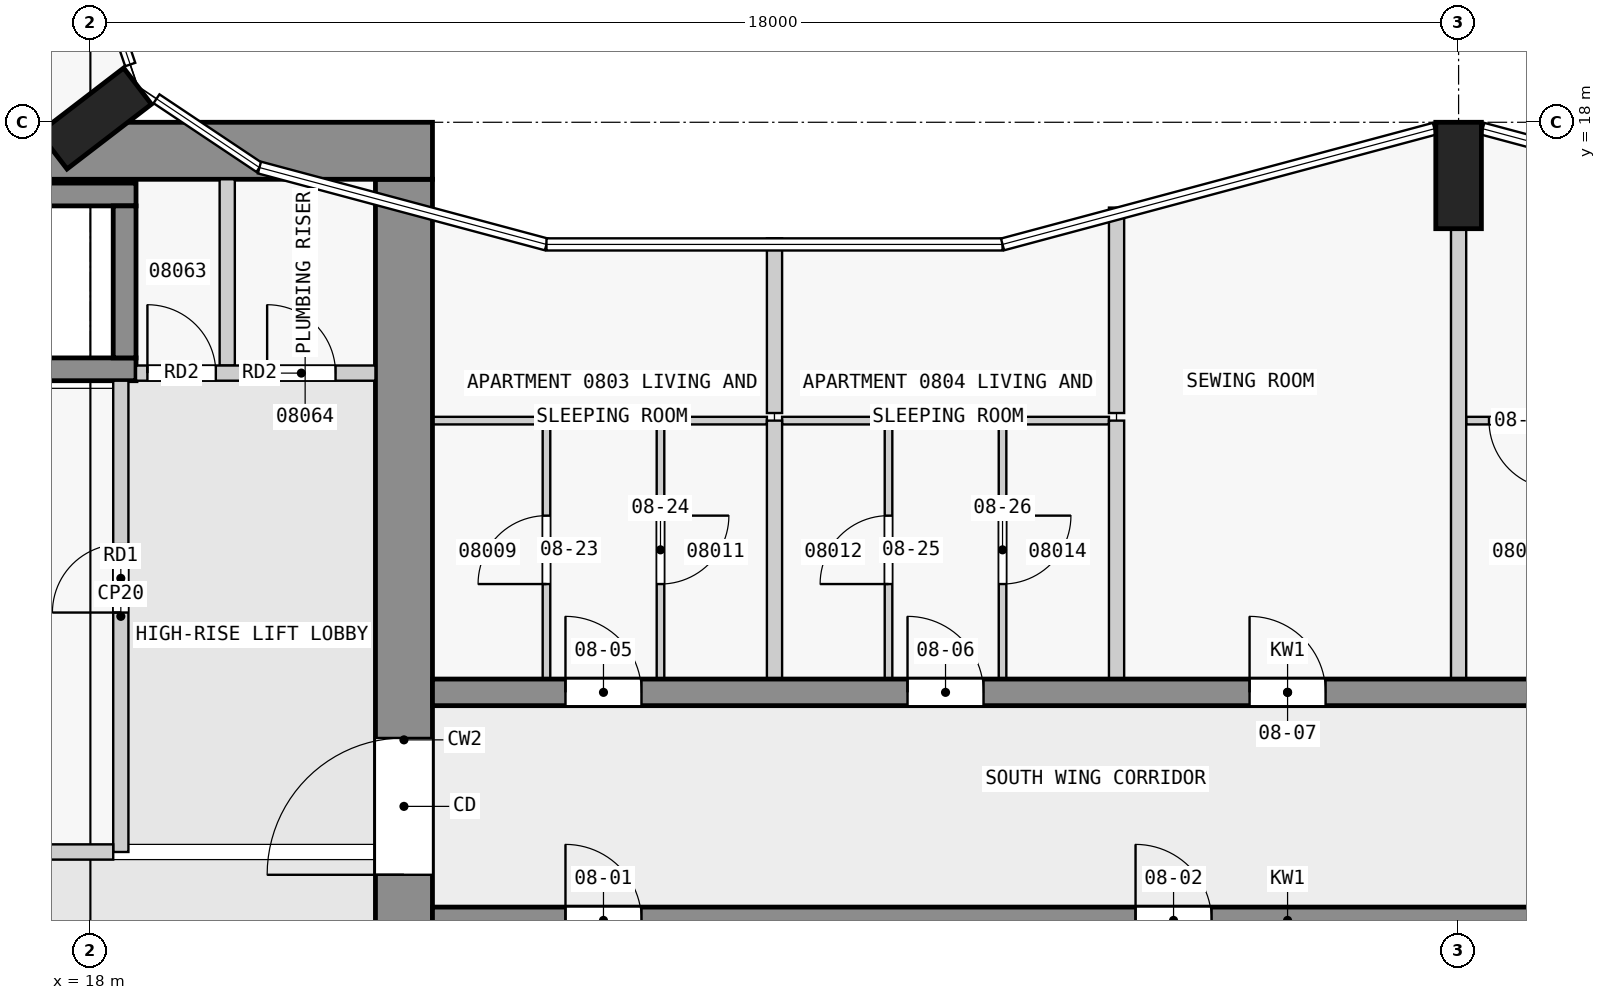
"""IFC4 building model, lengths in metres.
Left out: names, types, materials, properties, quantities, classifications, styles, units other than length and angle.
Written with IfcOpenShell. Run it as: python <this file> out.ifc"""

import sys

from ifc_helpers import new_model, si_unit, direction, frame, frame_2d, origin, origin_2d, place, context, subcontext, project, spatial, rectangle, extrude, element, fill, save


model = new_model("IFC4")
c1 = context("Model", 3, precision=1e-05, world=origin(), true_north=direction((0.0, 1.0)))
c2 = subcontext(c1, "Body", "Model", "MODEL_VIEW")
j1 = project(units=[si_unit("LENGTHUNIT", "METRE"), si_unit("PLANEANGLEUNIT", "RADIAN")], contexts=[c1])
p1 = place(None, origin())
s1 = spatial("IfcSite", under=j1, at=p1, CompositionType="ELEMENT")
p2 = place(p1, origin())
s2 = spatial("IfcBuilding", under=s1, at=p2, CompositionType="ELEMENT")
p3 = place(p2, frame((0.0, 0.0, 37.3)))
s3 = spatial("IfcBuildingStorey", under=s2, at=p3, CompositionType="ELEMENT", Elevation=37.3)
for number, where, z_axis, x_axis in (
    (1, (36.0, 17.3, 0.0), (0.0, 0.0, 1.0), (1.0, 0.0, 0.0)),
    (2, (18.065, 18.05, 0.0), (0.0, 0.0, 1.0), (-0.609, 0.793, 0.0)),
):
    element("IfcColumn", number, at=place(p3, frame(where, z_axis=z_axis, x_axis=x_axis)), inside=s3, PredefinedType="COLUMN", context=c2, shape_type="SweptSolid", body=[
        extrude(rectangle(XDim=0.6, YDim=1.4, at=origin_2d()), origin(), (0.0, 0.0, 1.0), 3.5),
    ])
p4 = place(p3, frame((1.55, 17.625, 0.0), z_axis=(0.0, 0.0, 1.0), x_axis=(1.0, 0.0, 0.0)))
e3 = element("IfcWall", 3, at=p4, inside=s3, PredefinedType="SHEAR", context=c2, shape_type="SweptSolid", body=[
    extrude(rectangle(XDim=20.95, YDim=0.75, at=frame_2d((10.475, 0.0))), origin(), (0.0, 0.0, 1.0), 3.25),
])
p5 = place(p4, frame((6.55, 0.0, 0.0)))
e4 = element("IfcOpeningElement", 4, at=p5, cuts=e3, PredefinedType="OPENING", context=c2, shape_type="SweptSolid", body=[
    extrude(rectangle(XDim=1.8, YDim=2.1, at=frame_2d((0.9, 1.05))), frame((0.0, 0.385, 0.0), z_axis=(0.0, -1.0, 0.0), x_axis=(1.0, 0.0, 0.0)), (0.0, 0.0, 1.0), 0.77),
])
p6 = place(p3, frame((22.125, 2.5, 0.0), z_axis=(0.0, 0.0, 1.0), x_axis=(0.0, 1.0, 0.0)))
e5 = element("IfcWall", 5, at=p6, inside=s3, PredefinedType="SHEAR", context=c2, shape_type="SweptSolid", body=[
    extrude(rectangle(XDim=14.75, YDim=0.75, at=frame_2d((7.375, 0.0))), origin(), (0.0, 0.0, 1.0), 3.25),
])
p7 = place(p6, frame((5.6, 0.0, 0.0)))
e6 = element("IfcOpeningElement", 6, at=p7, cuts=e5, PredefinedType="OPENING", context=c2, shape_type="SweptSolid", body=[
    extrude(rectangle(XDim=1.8, YDim=2.1, at=frame_2d((0.9, 1.05))), frame((0.0, 0.385, 0.0), z_axis=(0.0, -1.0, 0.0), x_axis=(1.0, 0.0, 0.0)), (0.0, 0.0, 1.0), 0.77),
])
for number, where, z_axis, x_axis in (
    (7, (10.8, 17.05, 0.0), (0.0, 0.0, 1.0), (1.0, 0.0, 0.0)),
    (8, (10.8, 14.75, 0.0), (0.0, 0.0, 1.0), (1.0, 0.0, 0.0)),
):
    element("IfcWall", number, at=place(p3, frame(where, z_axis=z_axis, x_axis=x_axis)), inside=s3, PredefinedType="SHEAR", context=c2, shape_type="SweptSolid", body=[
        extrude(rectangle(XDim=7.8, YDim=0.3, at=frame_2d((3.9, 0.0))), origin(), (0.0, 0.0, 1.0), 3.25),
    ])
p8 = place(p3, frame((18.45, 14.9, 0.0), z_axis=(0.0, 0.0, 1.0), x_axis=(0.0, 1.0, 0.0)))
e9 = element("IfcWall", 9, at=p8, inside=s3, PredefinedType="SHEAR", context=c2, shape_type="SweptSolid", body=[
    extrude(rectangle(XDim=2.0, YDim=0.3, at=frame_2d((1.0, 0.0))), origin(), (0.0, 0.0, 1.0), 3.25),
])
p9 = place(p3, frame((22.5, 7.5, 0.0), z_axis=(0.0, 0.0, 1.0), x_axis=(1.0, 0.0, 0.0)))
e10 = element("IfcWall", 10, at=p9, inside=s3, PredefinedType="SHEAR", context=c2, shape_type="SweptSolid", body=[
    extrude(rectangle(XDim=22.5, YDim=0.35, at=frame_2d((11.25, 0.0))), origin(), (0.0, 0.0, 1.0), 3.25),
])
p10 = place(p9, frame((1.75, 0.0, 0.0)))
e11 = element("IfcOpeningElement", 11, at=p10, cuts=e10, PredefinedType="OPENING", context=c2, shape_type="SweptSolid", body=[
    extrude(rectangle(XDim=1.0, YDim=2.1, at=frame_2d((0.5, 1.05))), frame((0.0, 0.185, 0.0), z_axis=(0.0, -1.0, 0.0), x_axis=(1.0, 0.0, 0.0)), (0.0, 0.0, 1.0), 0.37),
])
p11 = place(p9, frame((9.25, 0.0, 0.0)))
e12 = element("IfcOpeningElement", 12, at=p11, cuts=e10, PredefinedType="OPENING", context=c2, shape_type="SweptSolid", body=[
    extrude(rectangle(XDim=1.0, YDim=2.1, at=frame_2d((0.5, 1.05))), frame((0.0, 0.185, 0.0), z_axis=(0.0, -1.0, 0.0), x_axis=(1.0, 0.0, 0.0)), (0.0, 0.0, 1.0), 0.37),
])
p12 = place(p9, frame((18.75, 0.0, 0.0)))
e13 = element("IfcOpeningElement", 13, at=p12, cuts=e10, PredefinedType="OPENING", context=c2, shape_type="SweptSolid", body=[
    extrude(rectangle(XDim=0.9, YDim=2.1, at=frame_2d((0.45, 1.05))), frame((0.0, 0.185, 0.0), z_axis=(0.0, -1.0, 0.0), x_axis=(1.0, 0.0, 0.0)), (0.0, 0.0, 1.0), 0.37),
])
p13 = place(p9, frame((20.95, 0.0, 0.0)))
e14 = element("IfcOpeningElement", 14, at=p13, cuts=e10, PredefinedType="OPENING", context=c2, shape_type="SweptSolid", body=[
    extrude(rectangle(XDim=1.0, YDim=2.1, at=frame_2d((0.5, 1.05))), frame((0.0, 0.185, 0.0), z_axis=(0.0, -1.0, 0.0), x_axis=(1.0, 0.0, 0.0)), (0.0, 0.0, 1.0), 0.37),
])
p14 = place(p3, frame((22.5, 10.5, 0.0), z_axis=(0.0, 0.0, 1.0), x_axis=(1.0, 0.0, 0.0)))
e15 = element("IfcWall", 15, at=p14, inside=s3, PredefinedType="SHEAR", context=c2, shape_type="SweptSolid", body=[
    extrude(rectangle(XDim=22.5, YDim=0.35, at=frame_2d((11.25, 0.0))), origin(), (0.0, 0.0, 1.0), 3.25),
])
p15 = place(p14, frame((1.75, 0.0, 0.0)))
e16 = element("IfcOpeningElement", 16, at=p15, cuts=e15, PredefinedType="OPENING", context=c2, shape_type="SweptSolid", body=[
    extrude(rectangle(XDim=1.0, YDim=2.1, at=frame_2d((0.5, 1.05))), frame((0.0, 0.185, 0.0), z_axis=(0.0, -1.0, 0.0), x_axis=(1.0, 0.0, 0.0)), (0.0, 0.0, 1.0), 0.37),
])
p16 = place(p14, frame((6.25, 0.0, 0.0)))
e17 = element("IfcOpeningElement", 17, at=p16, cuts=e15, PredefinedType="OPENING", context=c2, shape_type="SweptSolid", body=[
    extrude(rectangle(XDim=1.0, YDim=2.1, at=frame_2d((0.5, 1.05))), frame((0.0, 0.185, 0.0), z_axis=(0.0, -1.0, 0.0), x_axis=(1.0, 0.0, 0.0)), (0.0, 0.0, 1.0), 0.37),
])
p17 = place(p14, frame((10.75, 0.0, 0.0)))
e18 = element("IfcOpeningElement", 18, at=p17, cuts=e15, PredefinedType="OPENING", context=c2, shape_type="SweptSolid", body=[
    extrude(rectangle(XDim=1.0, YDim=2.1, at=frame_2d((0.5, 1.05))), frame((0.0, 0.185, 0.0), z_axis=(0.0, -1.0, 0.0), x_axis=(1.0, 0.0, 0.0)), (0.0, 0.0, 1.0), 0.37),
])
p18 = place(p14, frame((16.85, 0.0, 0.0)))
e19 = element("IfcOpeningElement", 19, at=p18, cuts=e15, PredefinedType="OPENING", context=c2, shape_type="SweptSolid", body=[
    extrude(rectangle(XDim=1.0, YDim=2.1, at=frame_2d((0.5, 1.05))), frame((0.0, 0.185, 0.0), z_axis=(0.0, -1.0, 0.0), x_axis=(1.0, 0.0, 0.0)), (0.0, 0.0, 1.0), 0.37),
])
p19 = place(p3, frame((10.9, 8.4, 0.0), z_axis=(0.0, 0.0, 1.0), x_axis=(1.0, 0.0, 0.0)))
e20 = element("IfcWall", 20, at=p19, inside=s3, PredefinedType="PARTITIONING", context=c2, shape_type="SweptSolid", body=[
    extrude(rectangle(XDim=7.4, YDim=0.2, at=frame_2d((3.7, 0.0))), origin(), (0.0, 0.0, 1.0), 3.25),
])
p20 = place(p3, frame((18.4, 8.4, 0.0), z_axis=(0.0, 0.0, 1.0), x_axis=(0.0, 1.0, 0.0)))
e21 = element("IfcWall", 21, at=p20, inside=s3, PredefinedType="PARTITIONING", context=c2, shape_type="SweptSolid", body=[
    extrude(rectangle(XDim=6.2, YDim=0.2, at=frame_2d((3.1, 0.0))), origin(), (0.0, 0.0, 1.0), 3.25),
])
p21 = place(p20, frame((3.15, 0.0, 0.0)))
e22 = element("IfcOpeningElement", 22, at=p21, cuts=e21, PredefinedType="OPENING", context=c2, shape_type="SweptSolid", body=[
    extrude(rectangle(XDim=0.9, YDim=2.1, at=frame_2d((0.45, 1.05))), frame((0.0, 0.11, 0.0), z_axis=(0.0, -1.0, 0.0), x_axis=(1.0, 0.0, 0.0)), (0.0, 0.0, 1.0), 0.22),
])
p22 = place(p3, frame((18.6, 14.7, 0.0), z_axis=(0.0, 0.0, 1.0), x_axis=(1.0, 0.0, 0.0)))
e23 = element("IfcWall", 23, at=p22, inside=s3, PredefinedType="PARTITIONING", context=c2, shape_type="SweptSolid", body=[
    extrude(rectangle(XDim=3.15, YDim=0.2, at=frame_2d((1.575, 0.0))), origin(), (0.0, 0.0, 1.0), 3.25),
])
p23 = place(p22, frame((0.15, 0.0, 0.0)))
e24 = element("IfcOpeningElement", 24, at=p23, cuts=e23, PredefinedType="OPENING", context=c2, shape_type="SweptSolid", body=[
    extrude(rectangle(XDim=0.9, YDim=2.1, at=frame_2d((0.45, 1.05))), frame((0.0, 0.11, 0.0), z_axis=(0.0, -1.0, 0.0), x_axis=(1.0, 0.0, 0.0)), (0.0, 0.0, 1.0), 0.22),
])
p24 = place(p22, frame((1.725, 0.0, 0.0)))
e25 = element("IfcOpeningElement", 25, at=p24, cuts=e23, PredefinedType="OPENING", context=c2, shape_type="SweptSolid", body=[
    extrude(rectangle(XDim=0.9, YDim=2.1, at=frame_2d((0.45, 1.05))), frame((0.0, 0.11, 0.0), z_axis=(0.0, -1.0, 0.0), x_axis=(1.0, 0.0, 0.0)), (0.0, 0.0, 1.0), 0.22),
])
p25 = place(p3, frame((19.8, 14.8, 0.0), z_axis=(0.0, 0.0, 1.0), x_axis=(0.0, 1.0, 0.0)))
e26 = element("IfcWall", 26, at=p25, inside=s3, PredefinedType="PARTITIONING", context=c2, shape_type="SweptSolid", body=[
    extrude(rectangle(XDim=2.45, YDim=0.2, at=frame_2d((1.225, 0.0))), origin(), (0.0, 0.0, 1.0), 3.25),
])
p26 = place(p3, frame((23.95, 14.075, 0.0), z_axis=(0.0, 0.0, 1.0), x_axis=(-1.0, 0.0, 0.0)))
e27 = element("IfcWall", 27, at=p26, inside=s3, PredefinedType="PARTITIONING", context=c2, shape_type="SweptSolid", body=[
    extrude(rectangle(XDim=1.45, YDim=0.1, at=frame_2d((0.725, 0.0))), origin(), (0.0, 0.0, 1.0), 3.25),
])
for number, where, z_axis, x_axis in (
    (28, (26.9, 14.075, 0.0), (0.0, 0.0, 1.0), (-1.0, 0.0, 0.0)),
    (29, (28.45, 14.075, 0.0), (0.0, 0.0, 1.0), (-1.0, 0.0, 0.0)),
    (30, (31.4, 14.075, 0.0), (0.0, 0.0, 1.0), (-1.0, 0.0, 0.0)),
):
    element("IfcWall", number, at=place(p3, frame(where, z_axis=z_axis, x_axis=x_axis)), inside=s3, PredefinedType="PARTITIONING", context=c2, shape_type="SweptSolid", body=[
        extrude(rectangle(XDim=1.35, YDim=0.1, at=frame_2d((0.675, 0.0))), origin(), (0.0, 0.0, 1.0), 3.25),
    ])
p27 = place(p3, frame((37.55, 14.075, 0.0), z_axis=(0.0, 0.0, 1.0), x_axis=(-1.0, 0.0, 0.0)))
e31 = element("IfcWall", 31, at=p27, inside=s3, PredefinedType="PARTITIONING", context=c2, shape_type="SweptSolid", body=[
    extrude(rectangle(XDim=1.45, YDim=0.1, at=frame_2d((0.725, 0.0))), origin(), (0.0, 0.0, 1.0), 3.25),
])
p28 = place(p27, frame((0.25, 0.0, 0.0)))
e32 = element("IfcOpeningElement", 32, at=p28, cuts=e31, PredefinedType="OPENING", context=c2, shape_type="SweptSolid", body=[
    extrude(rectangle(XDim=0.9, YDim=2.1, at=frame_2d((0.45, 1.05))), frame((0.0, 0.06, 0.0), z_axis=(0.0, -1.0, 0.0), x_axis=(1.0, 0.0, 0.0)), (0.0, 0.0, 1.0), 0.12),
])
p29 = place(p3, frame((24.0, 10.675, 0.0), z_axis=(0.0, 0.0, 1.0), x_axis=(0.0, 1.0, 0.0)))
e33 = element("IfcWall", 33, at=p29, inside=s3, PredefinedType="PARTITIONING", context=c2, shape_type="SweptSolid", body=[
    extrude(rectangle(XDim=3.4, YDim=0.1, at=frame_2d((1.7, 0.0))), origin(), (0.0, 0.0, 1.0), 3.25),
])
p30 = place(p29, frame((1.25, 0.0, 0.0)))
e34 = element("IfcOpeningElement", 34, at=p30, cuts=e33, PredefinedType="OPENING", context=c2, shape_type="SweptSolid", body=[
    extrude(rectangle(XDim=0.9, YDim=2.1, at=frame_2d((0.45, 1.05))), frame((0.0, 0.06, 0.0), z_axis=(0.0, -1.0, 0.0), x_axis=(1.0, 0.0, 0.0)), (0.0, 0.0, 1.0), 0.12),
])
p31 = place(p3, frame((25.5, 14.075, 0.0), z_axis=(0.0, 0.0, 1.0), x_axis=(0.0, -1.0, 0.0)))
e35 = element("IfcWall", 35, at=p31, inside=s3, PredefinedType="PARTITIONING", context=c2, shape_type="SweptSolid", body=[
    extrude(rectangle(XDim=3.4, YDim=0.1, at=frame_2d((1.7, 0.0))), origin(), (0.0, 0.0, 1.0), 3.25),
])
p32 = place(p31, frame((1.25, 0.0, 0.0)))
e36 = element("IfcOpeningElement", 36, at=p32, cuts=e35, PredefinedType="OPENING", context=c2, shape_type="SweptSolid", body=[
    extrude(rectangle(XDim=0.9, YDim=2.1, at=frame_2d((0.45, 1.05))), frame((0.0, 0.06, 0.0), z_axis=(0.0, -1.0, 0.0), x_axis=(1.0, 0.0, 0.0)), (0.0, 0.0, 1.0), 0.12),
])
p33 = place(p3, frame((27.0, 16.473, 0.0), z_axis=(0.0, 0.0, 1.0), x_axis=(0.0, -1.0, 0.0)))
e37 = element("IfcWall", 37, at=p33, inside=s3, PredefinedType="PARTITIONING", context=c2, shape_type="SweptSolid", body=[
    extrude(rectangle(XDim=2.298, YDim=0.2, at=frame_2d((1.149, 0.0))), origin(), (0.0, 0.0, 1.0), 3.25),
])
p34 = place(p3, frame((27.0, 10.675, 0.0), z_axis=(0.0, 0.0, 1.0), x_axis=(0.0, 1.0, 0.0)))
e38 = element("IfcWall", 38, at=p34, inside=s3, PredefinedType="PARTITIONING", context=c2, shape_type="SweptSolid", body=[
    extrude(rectangle(XDim=3.4, YDim=0.2, at=frame_2d((1.7, 0.0))), origin(), (0.0, 0.0, 1.0), 3.25),
])
p35 = place(p3, frame((28.5, 10.675, 0.0), z_axis=(0.0, 0.0, 1.0), x_axis=(0.0, 1.0, 0.0)))
e39 = element("IfcWall", 39, at=p35, inside=s3, PredefinedType="PARTITIONING", context=c2, shape_type="SweptSolid", body=[
    extrude(rectangle(XDim=3.4, YDim=0.1, at=frame_2d((1.7, 0.0))), origin(), (0.0, 0.0, 1.0), 3.25),
])
p36 = place(p35, frame((1.25, 0.0, 0.0)))
e40 = element("IfcOpeningElement", 40, at=p36, cuts=e39, PredefinedType="OPENING", context=c2, shape_type="SweptSolid", body=[
    extrude(rectangle(XDim=0.9, YDim=2.1, at=frame_2d((0.45, 1.05))), frame((0.0, 0.06, 0.0), z_axis=(0.0, -1.0, 0.0), x_axis=(1.0, 0.0, 0.0)), (0.0, 0.0, 1.0), 0.12),
])
p37 = place(p3, frame((30.0, 14.075, 0.0), z_axis=(0.0, 0.0, 1.0), x_axis=(0.0, -1.0, 0.0)))
e41 = element("IfcWall", 41, at=p37, inside=s3, PredefinedType="PARTITIONING", context=c2, shape_type="SweptSolid", body=[
    extrude(rectangle(XDim=3.4, YDim=0.1, at=frame_2d((1.7, 0.0))), origin(), (0.0, 0.0, 1.0), 3.25),
])
p38 = place(p37, frame((1.25, 0.0, 0.0)))
e42 = element("IfcOpeningElement", 42, at=p38, cuts=e41, PredefinedType="OPENING", context=c2, shape_type="SweptSolid", body=[
    extrude(rectangle(XDim=0.9, YDim=2.1, at=frame_2d((0.45, 1.05))), frame((0.0, 0.06, 0.0), z_axis=(0.0, -1.0, 0.0), x_axis=(1.0, 0.0, 0.0)), (0.0, 0.0, 1.0), 0.12),
])
p39 = place(p3, frame((31.5, 16.878, 0.0), z_axis=(0.0, 0.0, 1.0), x_axis=(0.0, -1.0, 0.0)))
e43 = element("IfcWall", 43, at=p39, inside=s3, PredefinedType="PARTITIONING", context=c2, shape_type="SweptSolid", body=[
    extrude(rectangle(XDim=2.703, YDim=0.2, at=frame_2d((1.351, 0.0))), origin(), (0.0, 0.0, 1.0), 3.25),
])
p40 = place(p3, frame((31.5, 10.675, 0.0), z_axis=(0.0, 0.0, 1.0), x_axis=(0.0, 1.0, 0.0)))
e44 = element("IfcWall", 44, at=p40, inside=s3, PredefinedType="PARTITIONING", context=c2, shape_type="SweptSolid", body=[
    extrude(rectangle(XDim=3.4, YDim=0.2, at=frame_2d((1.7, 0.0))), origin(), (0.0, 0.0, 1.0), 3.25),
])
p41 = place(p3, frame((36.0, 10.675, 0.0), z_axis=(0.0, 0.0, 1.0), x_axis=(0.0, 1.0, 0.0)))
e45 = element("IfcWall", 45, at=p41, inside=s3, PredefinedType="PARTITIONING", context=c2, shape_type="SweptSolid", body=[
    extrude(rectangle(XDim=5.925, YDim=0.2, at=frame_2d((2.962, 0.0))), origin(), (0.0, 0.0, 1.0), 3.25),
])
p42 = place(p21, origin())
e46 = element("IfcDoor", 46, at=p42, inside=s3, OperationType="SINGLE_SWING_LEFT", PredefinedType="DOOR", context=c2, shape_type="SweptSolid", body=[
    extrude(rectangle(XDim=0.9, YDim=2.1, at=frame_2d((0.45, 1.05))), frame((0.0, 0.025, 0.0), z_axis=(0.0, -1.0, 0.0), x_axis=(1.0, 0.0, 0.0)), (0.0, 0.0, 1.0), 0.05),
])
fill(e22, e46)
p43 = place(p7, origin())
e47 = element("IfcDoor", 47, at=p43, inside=s3, OperationType="DOUBLE_DOOR_SINGLE_SWING", PredefinedType="DOOR", context=c2, shape_type="SweptSolid", body=[
    extrude(rectangle(XDim=1.8, YDim=2.1, at=frame_2d((0.9, 1.05))), frame((0.0, 0.025, 0.0), z_axis=(0.0, -1.0, 0.0), x_axis=(1.0, 0.0, 0.0)), (0.0, 0.0, 1.0), 0.05),
])
fill(e6, e47)
p44 = place(p23, origin())
e48 = element("IfcDoor", 48, at=p44, inside=s3, OperationType="SINGLE_SWING_LEFT", PredefinedType="DOOR", context=c2, shape_type="SweptSolid", body=[
    extrude(rectangle(XDim=0.9, YDim=2.1, at=frame_2d((0.45, 1.05))), frame((0.0, 0.025, 0.0), z_axis=(0.0, -1.0, 0.0), x_axis=(1.0, 0.0, 0.0)), (0.0, 0.0, 1.0), 0.05),
])
fill(e24, e48)
p45 = place(p24, origin())
e49 = element("IfcDoor", 49, at=p45, inside=s3, OperationType="SINGLE_SWING_LEFT", PredefinedType="DOOR", context=c2, shape_type="SweptSolid", body=[
    extrude(rectangle(XDim=0.9, YDim=2.1, at=frame_2d((0.45, 1.05))), frame((0.0, 0.025, 0.0), z_axis=(0.0, -1.0, 0.0), x_axis=(1.0, 0.0, 0.0)), (0.0, 0.0, 1.0), 0.05),
])
fill(e25, e49)
p46 = place(p10, origin())
e50 = element("IfcDoor", 50, at=p46, inside=s3, OperationType="SINGLE_SWING_LEFT", PredefinedType="DOOR", context=c2, shape_type="SweptSolid", body=[
    extrude(rectangle(XDim=1.0, YDim=2.1, at=frame_2d((0.5, 1.05))), frame((0.0, 0.025, 0.0), z_axis=(0.0, -1.0, 0.0), x_axis=(1.0, 0.0, 0.0)), (0.0, 0.0, 1.0), 0.05),
])
fill(e11, e50)
p47 = place(p11, origin())
e51 = element("IfcDoor", 51, at=p47, inside=s3, OperationType="SINGLE_SWING_LEFT", PredefinedType="DOOR", context=c2, shape_type="SweptSolid", body=[
    extrude(rectangle(XDim=1.0, YDim=2.1, at=frame_2d((0.5, 1.05))), frame((0.0, 0.025, 0.0), z_axis=(0.0, -1.0, 0.0), x_axis=(1.0, 0.0, 0.0)), (0.0, 0.0, 1.0), 0.05),
])
fill(e12, e51)
p48 = place(p15, origin())
e52 = element("IfcDoor", 52, at=p48, inside=s3, OperationType="SINGLE_SWING_LEFT", PredefinedType="DOOR", context=c2, shape_type="SweptSolid", body=[
    extrude(rectangle(XDim=1.0, YDim=2.1, at=frame_2d((0.5, 1.05))), frame((0.0, 0.025, 0.0), z_axis=(0.0, -1.0, 0.0), x_axis=(1.0, 0.0, 0.0)), (0.0, 0.0, 1.0), 0.05),
])
fill(e16, e52)
p49 = place(p16, origin())
e53 = element("IfcDoor", 53, at=p49, inside=s3, OperationType="SINGLE_SWING_LEFT", PredefinedType="DOOR", context=c2, shape_type="SweptSolid", body=[
    extrude(rectangle(XDim=1.0, YDim=2.1, at=frame_2d((0.5, 1.05))), frame((0.0, 0.025, 0.0), z_axis=(0.0, -1.0, 0.0), x_axis=(1.0, 0.0, 0.0)), (0.0, 0.0, 1.0), 0.05),
])
fill(e17, e53)
p50 = place(p17, origin())
e54 = element("IfcDoor", 54, at=p50, inside=s3, OperationType="SINGLE_SWING_LEFT", PredefinedType="DOOR", context=c2, shape_type="SweptSolid", body=[
    extrude(rectangle(XDim=1.0, YDim=2.1, at=frame_2d((0.5, 1.05))), frame((0.0, 0.025, 0.0), z_axis=(0.0, -1.0, 0.0), x_axis=(1.0, 0.0, 0.0)), (0.0, 0.0, 1.0), 0.05),
])
fill(e18, e54)
p51 = place(p30, origin())
e55 = element("IfcDoor", 55, at=p51, inside=s3, OperationType="SINGLE_SWING_RIGHT", PredefinedType="DOOR", context=c2, shape_type="SweptSolid", body=[
    extrude(rectangle(XDim=0.9, YDim=2.1, at=frame_2d((0.45, 1.05))), frame((0.0, 0.025, 0.0), z_axis=(0.0, -1.0, 0.0), x_axis=(1.0, 0.0, 0.0)), (0.0, 0.0, 1.0), 0.05),
])
fill(e34, e55)
p52 = place(p32, origin())
e56 = element("IfcDoor", 56, at=p52, inside=s3, OperationType="SINGLE_SWING_RIGHT", PredefinedType="DOOR", context=c2, shape_type="SweptSolid", body=[
    extrude(rectangle(XDim=0.9, YDim=2.1, at=frame_2d((0.45, 1.05))), frame((0.0, 0.025, 0.0), z_axis=(0.0, -1.0, 0.0), x_axis=(1.0, 0.0, 0.0)), (0.0, 0.0, 1.0), 0.05),
])
fill(e36, e56)
p53 = place(p36, origin())
e57 = element("IfcDoor", 57, at=p53, inside=s3, OperationType="SINGLE_SWING_RIGHT", PredefinedType="DOOR", context=c2, shape_type="SweptSolid", body=[
    extrude(rectangle(XDim=0.9, YDim=2.1, at=frame_2d((0.45, 1.05))), frame((0.0, 0.025, 0.0), z_axis=(0.0, -1.0, 0.0), x_axis=(1.0, 0.0, 0.0)), (0.0, 0.0, 1.0), 0.05),
])
fill(e40, e57)
p54 = place(p38, origin())
e58 = element("IfcDoor", 58, at=p54, inside=s3, OperationType="SINGLE_SWING_RIGHT", PredefinedType="DOOR", context=c2, shape_type="SweptSolid", body=[
    extrude(rectangle(XDim=0.9, YDim=2.1, at=frame_2d((0.45, 1.05))), frame((0.0, 0.025, 0.0), z_axis=(0.0, -1.0, 0.0), x_axis=(1.0, 0.0, 0.0)), (0.0, 0.0, 1.0), 0.05),
])
fill(e42, e58)
p55 = place(p28, origin())
e59 = element("IfcDoor", 59, at=p55, inside=s3, OperationType="SINGLE_SWING_LEFT", PredefinedType="DOOR", context=c2, shape_type="SweptSolid", body=[
    extrude(rectangle(XDim=0.9, YDim=2.1, at=frame_2d((0.45, 1.05))), frame((0.0, 0.025, 0.0), z_axis=(0.0, -1.0, 0.0), x_axis=(1.0, 0.0, 0.0)), (0.0, 0.0, 1.0), 0.05),
])
fill(e32, e59)
save(model, sys.argv[1])
